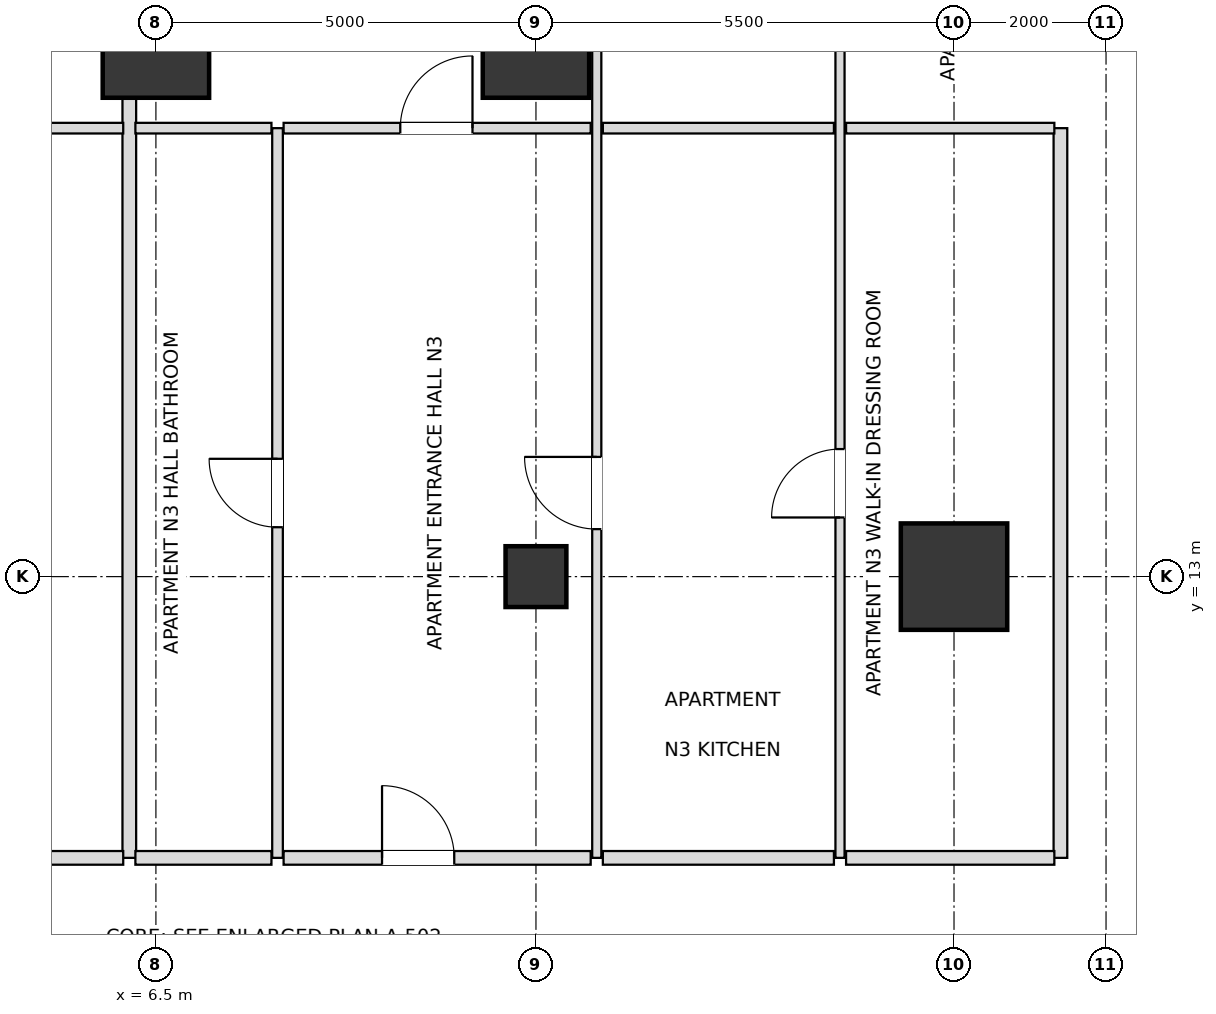
"""IFC4 building model, lengths in metres.
Left out: names, types, materials, properties, quantities, classifications, styles, units other than length and angle.
Written with IfcOpenShell. Run it as: python <this file> out.ifc"""

import sys

from ifc_helpers import new_model, si_unit, direction, frame, frame_2d, origin, origin_2d, place, context, subcontext, project, spatial, rectangle, extrude, element, fill, save


model = new_model("IFC4")
c1 = context("Model", 3, precision=1e-05, world=origin(), true_north=direction((0.0, 1.0)))
c2 = subcontext(c1, "Body", "Model", "MODEL_VIEW")
j1 = project(units=[si_unit("LENGTHUNIT", "METRE"), si_unit("PLANEANGLEUNIT", "RADIAN")], contexts=[c1])
p1 = place(None, origin())
s1 = spatial("IfcSite", under=j1, at=p1, CompositionType="ELEMENT")
p2 = place(p1, origin())
s2 = spatial("IfcBuilding", under=s1, at=p2, CompositionType="ELEMENT")
p3 = place(p2, frame((0.0, 0.0, 39.6)))
s3 = spatial("IfcBuildingStorey", under=s2, at=p3, CompositionType="ELEMENT", Elevation=39.6)
for number, where, z_axis, x_axis in (
    (1, (17.0, 13.0, 0.0), (0.0, 0.0, 1.0), (1.0, 0.0, 0.0)),
    (2, (11.5, 20.0, 0.0), (0.0, 0.0, 1.0), (1.0, 0.0, 0.0)),
    (3, (6.5, 20.0, 0.0), (0.0, 0.0, 1.0), (1.0, 0.0, 0.0)),
):
    element("IfcColumn", number, at=place(p3, frame(where, z_axis=z_axis, x_axis=x_axis)), inside=s3, PredefinedType="USERDEFINED", context=c2, shape_type="SweptSolid", body=[
        extrude(rectangle(XDim=1.4, YDim=1.4, at=origin_2d()), origin(), (0.0, 0.0, 1.0), 3.6),
    ])
p4 = place(p3, frame((11.5, 13.0, 0.0), z_axis=(0.0, 0.0, 1.0), x_axis=(1.0, 0.0, 0.0)))
e4 = element("IfcColumn", 4, at=p4, inside=s3, PredefinedType="COLUMN", context=c2, shape_type="SweptSolid", body=[
    extrude(rectangle(XDim=0.8, YDim=0.8, at=origin_2d()), origin(), (0.0, 0.0, 1.0), 3.6),
])
p5 = place(p3, frame((6.15, 9.3, 0.0), z_axis=(0.0, 0.0, 1.0), x_axis=(0.0, 1.0, 0.0)))
e5 = element("IfcWall", 5, at=p5, inside=s3, PredefinedType="PARTITIONING", context=c2, shape_type="SweptSolid", body=[
    extrude(rectangle(XDim=15.6, YDim=0.18, at=frame_2d((7.8, 0.0))), origin(), (0.0, 0.0, 1.0), 2.816),
])
p6 = place(p3, frame((8.1, 9.3, 0.0), z_axis=(0.0, 0.0, 1.0), x_axis=(0.0, 1.0, 0.0)))
e6 = element("IfcWall", 6, at=p6, inside=s3, PredefinedType="PARTITIONING", context=c2, shape_type="SweptSolid", body=[
    extrude(rectangle(XDim=9.6, YDim=0.14, at=frame_2d((4.8, 0.0))), origin(), (0.0, 0.0, 1.0), 2.816),
])
p7 = place(p6, frame((4.35, 0.0, 0.0)))
e7 = element("IfcOpeningElement", 7, at=p7, cuts=e6, PredefinedType="OPENING", context=c2, shape_type="SweptSolid", body=[
    extrude(rectangle(XDim=0.9, YDim=2.1, at=frame_2d((0.45, 1.05))), frame((0.0, 0.08, 0.0), z_axis=(0.0, -1.0, 0.0), x_axis=(1.0, 0.0, 0.0)), (0.0, 0.0, 1.0), 0.16),
])
p8 = place(p3, frame((12.3, 9.3, 0.0), z_axis=(0.0, 0.0, 1.0), x_axis=(0.0, 1.0, 0.0)))
e8 = element("IfcWall", 8, at=p8, inside=s3, PredefinedType="PARTITIONING", context=c2, shape_type="SweptSolid", body=[
    extrude(rectangle(XDim=15.6, YDim=0.12, at=frame_2d((7.8, 0.0))), origin(), (0.0, 0.0, 1.0), 2.736),
])
p9 = place(p8, frame((4.325, 0.0, 0.0)))
e9 = element("IfcOpeningElement", 9, at=p9, cuts=e8, PredefinedType="OPENING", context=c2, shape_type="SweptSolid", body=[
    extrude(rectangle(XDim=0.95, YDim=2.1, at=frame_2d((0.475, 1.05))), frame((0.0, 0.07, 0.0), z_axis=(0.0, -1.0, 0.0), x_axis=(1.0, 0.0, 0.0)), (0.0, 0.0, 1.0), 0.14),
])
p10 = place(p8, frame((12.15, 0.0, 0.0)))
e10 = element("IfcOpeningElement", 10, at=p10, cuts=e8, PredefinedType="OPENING", context=c2, shape_type="SweptSolid", body=[
    extrude(rectangle(XDim=0.9, YDim=2.1, at=frame_2d((0.45, 1.05))), frame((0.0, 0.07, 0.0), z_axis=(0.0, -1.0, 0.0), x_axis=(1.0, 0.0, 0.0)), (0.0, 0.0, 1.0), 0.14),
])
p11 = place(p3, frame((15.5, 9.3, 0.0), z_axis=(0.0, 0.0, 1.0), x_axis=(0.0, 1.0, 0.0)))
e11 = element("IfcWall", 11, at=p11, inside=s3, PredefinedType="PARTITIONING", context=c2, shape_type="SweptSolid", body=[
    extrude(rectangle(XDim=15.6, YDim=0.12, at=frame_2d((7.8, 0.0))), origin(), (0.0, 0.0, 1.0), 2.736),
])
p12 = place(p11, frame((4.478, 0.0, 0.0)))
e12 = element("IfcOpeningElement", 12, at=p12, cuts=e11, PredefinedType="OPENING", context=c2, shape_type="SweptSolid", body=[
    extrude(rectangle(XDim=0.9, YDim=2.1, at=frame_2d((0.45, 1.05))), frame((0.0, 0.07, 0.0), z_axis=(0.0, -1.0, 0.0), x_axis=(1.0, 0.0, 0.0)), (0.0, 0.0, 1.0), 0.14),
])
p13 = place(p11, frame((12.15, 0.0, 0.0)))
e13 = element("IfcOpeningElement", 13, at=p13, cuts=e11, PredefinedType="OPENING", context=c2, shape_type="SweptSolid", body=[
    extrude(rectangle(XDim=0.9, YDim=2.1, at=frame_2d((0.45, 1.05))), frame((0.0, 0.07, 0.0), z_axis=(0.0, -1.0, 0.0), x_axis=(1.0, 0.0, 0.0)), (0.0, 0.0, 1.0), 0.14),
])
p14 = place(p3, frame((18.4, 9.3, 0.0), z_axis=(0.0, 0.0, 1.0), x_axis=(0.0, 1.0, 0.0)))
e14 = element("IfcWall", 14, at=p14, inside=s3, PredefinedType="PARTITIONING", context=c2, shape_type="SweptSolid", body=[
    extrude(rectangle(XDim=9.6, YDim=0.18, at=frame_2d((4.8, 0.0))), origin(), (0.0, 0.0, 1.0), 2.736),
])
p15 = place(p3, frame((3.28, 9.3, 0.0), z_axis=(0.0, 0.0, 1.0), x_axis=(1.0, 0.0, 0.0)))
e15 = element("IfcWall", 15, at=p15, inside=s3, PredefinedType="PARTITIONING", context=c2, shape_type="SweptSolid", body=[
    extrude(rectangle(XDim=2.79, YDim=0.18, at=frame_2d((1.395, 0.0))), origin(), (0.0, 0.0, 1.0), 3.38),
])
p16 = place(p3, frame((6.23, 9.3, 0.0), z_axis=(0.0, 0.0, 1.0), x_axis=(1.0, 0.0, 0.0)))
e16 = element("IfcWall", 16, at=p16, inside=s3, PredefinedType="PARTITIONING", context=c2, shape_type="SweptSolid", body=[
    extrude(rectangle(XDim=1.79, YDim=0.18, at=frame_2d((0.895, 0.0))), origin(), (0.0, 0.0, 1.0), 2.816),
])
p17 = place(p3, frame((8.18, 9.3, 0.0), z_axis=(0.0, 0.0, 1.0), x_axis=(1.0, 0.0, 0.0)))
e17 = element("IfcWall", 17, at=p17, inside=s3, PredefinedType="PARTITIONING", context=c2, shape_type="SweptSolid", body=[
    extrude(rectangle(XDim=4.04, YDim=0.18, at=frame_2d((2.02, 0.0))), origin(), (0.0, 0.0, 1.0), 3.38),
])
p18 = place(p17, frame((1.295, 0.0, 0.0)))
e18 = element("IfcOpeningElement", 18, at=p18, cuts=e17, PredefinedType="OPENING", context=c2, shape_type="SweptSolid", body=[
    extrude(rectangle(XDim=0.95, YDim=2.15, at=frame_2d((0.475, 1.075))), frame((0.0, 0.1, 0.0), z_axis=(0.0, -1.0, 0.0), x_axis=(1.0, 0.0, 0.0)), (0.0, 0.0, 1.0), 0.2),
])
p19 = place(p3, frame((12.38, 9.3, 0.0), z_axis=(0.0, 0.0, 1.0), x_axis=(1.0, 0.0, 0.0)))
e19 = element("IfcWall", 19, at=p19, inside=s3, PredefinedType="PARTITIONING", context=c2, shape_type="SweptSolid", body=[
    extrude(rectangle(XDim=3.04, YDim=0.18, at=frame_2d((1.52, 0.0))), origin(), (0.0, 0.0, 1.0), 3.38),
])
p20 = place(p3, frame((15.58, 9.3, 0.0), z_axis=(0.0, 0.0, 1.0), x_axis=(1.0, 0.0, 0.0)))
e20 = element("IfcWall", 20, at=p20, inside=s3, PredefinedType="PARTITIONING", context=c2, shape_type="SweptSolid", body=[
    extrude(rectangle(XDim=2.74, YDim=0.18, at=frame_2d((1.37, 0.0))), origin(), (0.0, 0.0, 1.0), 2.816),
])
p21 = place(p3, frame((3.28, 18.9, 0.0), z_axis=(0.0, 0.0, 1.0), x_axis=(1.0, 0.0, 0.0)))
e21 = element("IfcWall", 21, at=p21, inside=s3, PredefinedType="PARTITIONING", context=c2, shape_type="SweptSolid", body=[
    extrude(rectangle(XDim=2.79, YDim=0.14, at=frame_2d((1.395, 0.0))), origin(), (0.0, 0.0, 1.0), 3.38),
])
p22 = place(p3, frame((6.23, 18.9, 0.0), z_axis=(0.0, 0.0, 1.0), x_axis=(1.0, 0.0, 0.0)))
e22 = element("IfcWall", 22, at=p22, inside=s3, PredefinedType="PARTITIONING", context=c2, shape_type="SweptSolid", body=[
    extrude(rectangle(XDim=1.79, YDim=0.14, at=frame_2d((0.895, 0.0))), origin(), (0.0, 0.0, 1.0), 2.816),
])
p23 = place(p3, frame((8.18, 18.9, 0.0), z_axis=(0.0, 0.0, 1.0), x_axis=(1.0, 0.0, 0.0)))
e23 = element("IfcWall", 23, at=p23, inside=s3, PredefinedType="PARTITIONING", context=c2, shape_type="SweptSolid", body=[
    extrude(rectangle(XDim=4.04, YDim=0.14, at=frame_2d((2.02, 0.0))), origin(), (0.0, 0.0, 1.0), 2.736),
])
p24 = place(p23, frame((1.535, 0.0, 0.0)))
e24 = element("IfcOpeningElement", 24, at=p24, cuts=e23, PredefinedType="OPENING", context=c2, shape_type="SweptSolid", body=[
    extrude(rectangle(XDim=0.95, YDim=2.1, at=frame_2d((0.475, 1.05))), frame((0.0, 0.08, 0.0), z_axis=(0.0, -1.0, 0.0), x_axis=(1.0, 0.0, 0.0)), (0.0, 0.0, 1.0), 0.16),
])
p25 = place(p3, frame((12.38, 18.9, 0.0), z_axis=(0.0, 0.0, 1.0), x_axis=(1.0, 0.0, 0.0)))
e25 = element("IfcWall", 25, at=p25, inside=s3, PredefinedType="PARTITIONING", context=c2, shape_type="SweptSolid", body=[
    extrude(rectangle(XDim=3.04, YDim=0.14, at=frame_2d((1.52, 0.0))), origin(), (0.0, 0.0, 1.0), 2.736),
])
p26 = place(p3, frame((15.58, 18.9, 0.0), z_axis=(0.0, 0.0, 1.0), x_axis=(1.0, 0.0, 0.0)))
e26 = element("IfcWall", 26, at=p26, inside=s3, PredefinedType="PARTITIONING", context=c2, shape_type="SweptSolid", body=[
    extrude(rectangle(XDim=2.74, YDim=0.14, at=frame_2d((1.37, 0.0))), origin(), (0.0, 0.0, 1.0), 2.736),
])
p27 = place(p7, origin())
e27 = element("IfcDoor", 27, at=p27, inside=s3, OperationType="SINGLE_SWING_RIGHT", PredefinedType="DOOR", context=c2, shape_type="SweptSolid", body=[
    extrude(rectangle(XDim=0.9, YDim=2.1, at=frame_2d((0.45, 1.05))), frame((0.0, 0.025, 0.0), z_axis=(0.0, -1.0, 0.0), x_axis=(1.0, 0.0, 0.0)), (0.0, 0.0, 1.0), 0.05),
])
fill(e7, e27)
p28 = place(p18, origin())
e28 = element("IfcDoor", 28, at=p28, inside=s3, OperationType="SINGLE_SWING_LEFT", PredefinedType="DOOR", context=c2, shape_type="SweptSolid", body=[
    extrude(rectangle(XDim=0.95, YDim=2.15, at=frame_2d((0.475, 1.075))), frame((0.0, 0.025, 0.0), z_axis=(0.0, -1.0, 0.0), x_axis=(1.0, 0.0, 0.0)), (0.0, 0.0, 1.0), 0.05),
])
fill(e18, e28)
p29 = place(p9, origin())
e29 = element("IfcDoor", 29, at=p29, inside=s3, OperationType="SINGLE_SWING_RIGHT", PredefinedType="DOOR", context=c2, shape_type="SweptSolid", body=[
    extrude(rectangle(XDim=0.95, YDim=2.1, at=frame_2d((0.475, 1.05))), frame((0.0, 0.025, 0.0), z_axis=(0.0, -1.0, 0.0), x_axis=(1.0, 0.0, 0.0)), (0.0, 0.0, 1.0), 0.05),
])
fill(e9, e29)
p30 = place(p12, origin())
e30 = element("IfcDoor", 30, at=p30, inside=s3, OperationType="SINGLE_SWING_LEFT", PredefinedType="DOOR", context=c2, shape_type="SweptSolid", body=[
    extrude(rectangle(XDim=0.9, YDim=2.1, at=frame_2d((0.45, 1.05))), frame((0.0, 0.025, 0.0), z_axis=(0.0, -1.0, 0.0), x_axis=(1.0, 0.0, 0.0)), (0.0, 0.0, 1.0), 0.05),
])
fill(e12, e30)
p31 = place(p24, origin())
e31 = element("IfcDoor", 31, at=p31, inside=s3, OperationType="SINGLE_SWING_RIGHT", PredefinedType="DOOR", context=c2, shape_type="SweptSolid", body=[
    extrude(rectangle(XDim=0.95, YDim=2.1, at=frame_2d((0.475, 1.05))), frame((0.0, 0.025, 0.0), z_axis=(0.0, -1.0, 0.0), x_axis=(1.0, 0.0, 0.0)), (0.0, 0.0, 1.0), 0.05),
])
fill(e24, e31)
save(model, sys.argv[1])
